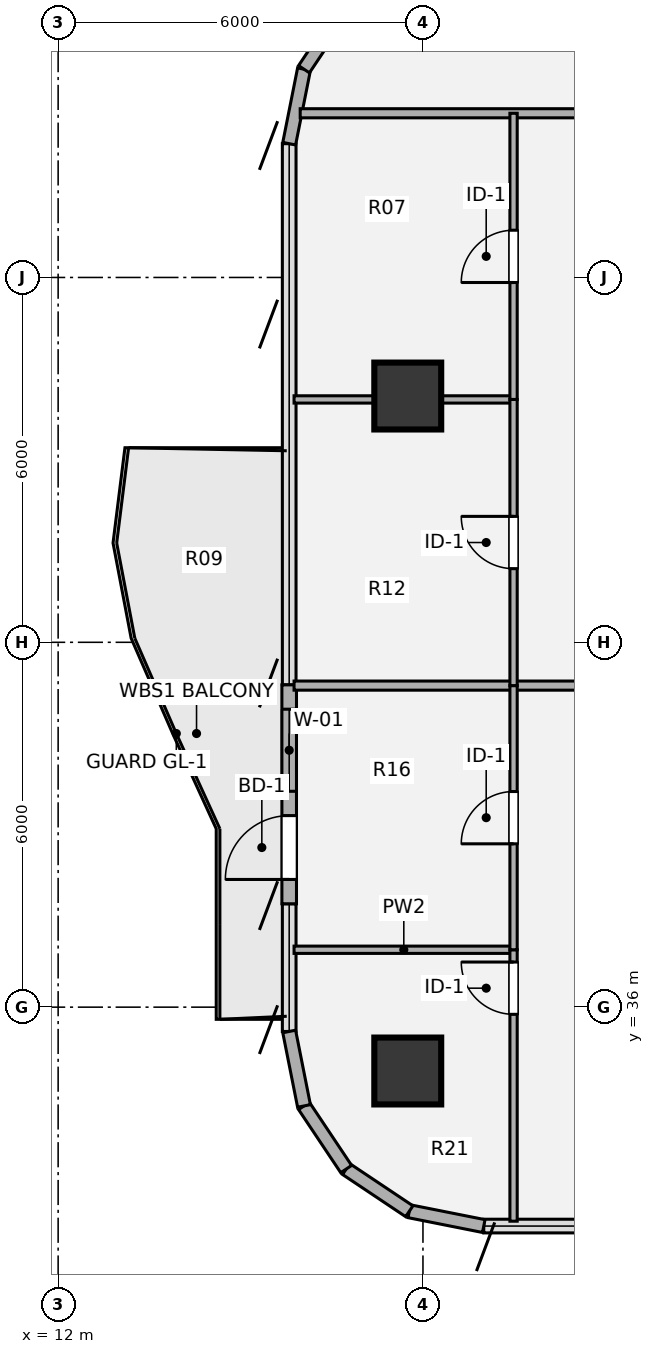
"""IFC4 building model, lengths in metres.
Left out: names, types, materials, properties, quantities, classifications, styles, units other than length and angle.
Written with IfcOpenShell. Run it as: python <this file> out.ifc"""

import sys

from ifc_helpers import new_model, si_unit, direction, frame, frame_2d, origin, origin_2d, place, context, subcontext, project, spatial, rectangle, hollow_circle, extrude, source, transform, mapped, element, fill, save


model = new_model("IFC4")
c1 = context("Model", 3, precision=1e-05, world=origin(), true_north=direction((0.0, 1.0)))
c2 = subcontext(c1, "Body", "Model", "MODEL_VIEW")
j1 = project(units=[si_unit("LENGTHUNIT", "METRE"), si_unit("PLANEANGLEUNIT", "RADIAN")], contexts=[c1])
p1 = place(None, origin())
s1 = spatial("IfcSite", under=j1, at=p1, CompositionType="ELEMENT")
p2 = place(p1, origin())
s2 = spatial("IfcBuilding", under=s1, at=p2, CompositionType="ELEMENT")
p3 = place(p2, frame((0.0, 0.0, 156.42)))
s3 = spatial("IfcBuildingStorey", under=s2, at=p3, CompositionType="ELEMENT", Elevation=156.42)
m1 = source(origin(), c2, "Body", "SweptSolid", [
    extrude(hollow_circle(Radius=0.55, WallThickness=0.04, at=origin_2d()), origin(), (0.0, 0.0, 1.0), 3.78),
])
for number, where, z_axis, x_axis in (
    (1, (17.75, 34.95, 0.0), (0.0, 0.0, 1.0), (1.0, 0.0, 0.0)),
    (2, (17.75, 46.05, 0.0), (0.0, 0.0, 1.0), (1.0, 0.0, 0.0)),
):
    element("IfcColumn", number, at=place(p3, frame(where, z_axis=z_axis, x_axis=x_axis)), inside=s3, PredefinedType="COLUMN", context=c2, shape_type="MappedRepresentation", body=[
        mapped(m1, transform((0.0, 0.0, 0.0), x_axis=(1.0, 0.0, 0.0), y_axis=(0.0, 1.0, 0.0), z_axis=(0.0, 0.0, 1.0), scale=1.0)),
    ])
for number, where, z_axis, x_axis in (
    (3, (19.0, 32.4, 0.0), (0.0, 0.0, 1.0), (-0.981, 0.195, 0.0)),
    (4, (17.775, 32.644, 0.0), (0.0, 0.0, 1.0), (-0.831, 0.556, 0.0)),
    (5, (16.737, 33.337, 0.0), (0.0, 0.0, 1.0), (-0.556, 0.831, 0.0)),
    (6, (16.044, 34.375, 0.0), (0.0, 0.0, 1.0), (-0.195, 0.981, 0.0)),
):
    element("IfcWall", number, at=place(p3, frame(where, z_axis=z_axis, x_axis=x_axis)), inside=s3, PredefinedType="SOLIDWALL", context=c2, shape_type="SweptSolid", body=[
        extrude(rectangle(XDim=1.249, YDim=0.215, at=frame_2d((0.624, 0.0))), origin(), (0.0, 0.0, 1.0), 3.53),
    ])
p4 = place(p3, frame((15.8, 37.7, 0.0), z_axis=(0.0, 0.0, 1.0), x_axis=(0.0, 1.0, 0.0)))
e7 = element("IfcWall", 7, at=p4, inside=s3, PredefinedType="SOLIDWALL", context=c2, shape_type="SweptSolid", body=[
    extrude(rectangle(XDim=3.6, YDim=0.24, at=frame_2d((1.8, 0.0))), origin(), (0.0, 0.0, 1.0), 3.53),
])
p5 = place(p4, frame((0.4, 0.0, 0.0)))
e8 = element("IfcOpeningElement", 8, at=p5, cuts=e7, PredefinedType="OPENING", context=c2, shape_type="SweptSolid", body=[
    extrude(rectangle(XDim=1.05, YDim=2.15, at=origin_2d()), frame((0.525, 0.13, 1.075), z_axis=(0.0, -1.0, 0.0), x_axis=(1.0, 0.0, 0.0)), (0.0, 0.0, 1.0), 0.26),
])
p6 = place(p4, frame((1.85, 0.0, 0.85)))
e9 = element("IfcOpeningElement", 9, at=p6, cuts=e7, PredefinedType="OPENING", context=c2, shape_type="SweptSolid", body=[
    extrude(rectangle(XDim=1.35, YDim=1.35, at=origin_2d()), frame((0.675, 0.13, 0.675), z_axis=(0.0, -1.0, 0.0), x_axis=(1.0, 0.0, 0.0)), (0.0, 0.0, 1.0), 0.26),
])
for number, where, z_axis, x_axis in (
    (10, (15.8, 50.2, 0.0), (0.0, 0.0, 1.0), (0.195, 0.981, 0.0)),
    (11, (16.044, 51.425, 0.0), (0.0, 0.0, 1.0), (0.556, 0.831, 0.0)),
):
    element("IfcWall", number, at=place(p3, frame(where, z_axis=z_axis, x_axis=x_axis)), inside=s3, PredefinedType="SOLIDWALL", context=c2, shape_type="SweptSolid", body=[
        extrude(rectangle(XDim=1.249, YDim=0.215, at=frame_2d((0.624, 0.0))), origin(), (0.0, 0.0, 1.0), 3.53),
    ])
p7 = place(p3, frame((15.88, 36.944, 0.0), z_axis=(0.0, 0.0, 1.0), x_axis=(1.0, 0.0, 0.0)))
e12 = element("IfcWall", 12, at=p7, inside=s3, PredefinedType="PARTITIONING", context=c2, shape_type="SweptSolid", body=[
    extrude(rectangle(XDim=3.61, YDim=0.12, at=frame_2d((1.805, 0.0))), origin(), (0.0, 0.0, 1.0), 2.982),
])
p8 = place(p3, frame((15.88, 41.288, 0.0), z_axis=(0.0, 0.0, 1.0), x_axis=(1.0, 0.0, 0.0)))
e13 = element("IfcWall", 13, at=p8, inside=s3, PredefinedType="PARTITIONING", context=c2, shape_type="SweptSolid", body=[
    extrude(rectangle(XDim=17.67, YDim=0.15, at=frame_2d((8.835, 0.0))), origin(), (0.0, 0.0, 1.0), 2.982),
])
p9 = place(p3, frame((15.88, 45.994, 0.0), z_axis=(0.0, 0.0, 1.0), x_axis=(1.0, 0.0, 0.0)))
e14 = element("IfcWall", 14, at=p9, inside=s3, PredefinedType="PARTITIONING", context=c2, shape_type="SweptSolid", body=[
    extrude(rectangle(XDim=3.61, YDim=0.12, at=frame_2d((1.805, 0.0))), origin(), (0.0, 0.0, 1.0), 2.903),
])
p10 = place(p3, frame((15.981, 50.7, 0.0), z_axis=(0.0, 0.0, 1.0), x_axis=(1.0, 0.0, 0.0)))
e15 = element("IfcWall", 15, at=p10, inside=s3, PredefinedType="PARTITIONING", context=c2, shape_type="SweptSolid", body=[
    extrude(rectangle(XDim=17.569, YDim=0.15, at=frame_2d((8.785, 0.0))), origin(), (0.0, 0.0, 1.0), 3.308),
])
p11 = place(p3, frame((19.49, 32.48, 0.0), z_axis=(0.0, 0.0, 1.0), x_axis=(0.0, 1.0, 0.0)))
e16 = element("IfcWall", 16, at=p11, inside=s3, PredefinedType="PARTITIONING", context=c2, shape_type="SweptSolid", body=[
    extrude(rectangle(XDim=4.464, YDim=0.12, at=frame_2d((2.232, 0.0))), origin(), (0.0, 0.0, 1.0), 3.5),
])
p12 = place(p11, frame((3.402, 0.0, 0.0)))
e17 = element("IfcOpeningElement", 17, at=p12, cuts=e16, PredefinedType="OPENING", context=c2, shape_type="SweptSolid", body=[
    extrude(rectangle(XDim=0.86, YDim=2.1, at=origin_2d()), frame((0.43, 0.07, 1.05), z_axis=(0.0, -1.0, 0.0), x_axis=(1.0, 0.0, 0.0)), (0.0, 0.0, 1.0), 0.14),
])
p13 = place(p3, frame((19.49, 36.944, 0.0), z_axis=(0.0, 0.0, 1.0), x_axis=(0.0, 1.0, 0.0)))
e18 = element("IfcWall", 18, at=p13, inside=s3, PredefinedType="PARTITIONING", context=c2, shape_type="SweptSolid", body=[
    extrude(rectangle(XDim=4.344, YDim=0.12, at=frame_2d((2.172, 0.0))), origin(), (0.0, 0.0, 1.0), 3.5),
])
p14 = place(p13, frame((1.742, 0.0, 0.0)))
e19 = element("IfcOpeningElement", 19, at=p14, cuts=e18, PredefinedType="OPENING", context=c2, shape_type="SweptSolid", body=[
    extrude(rectangle(XDim=0.86, YDim=2.1, at=origin_2d()), frame((0.43, 0.07, 1.05), z_axis=(0.0, -1.0, 0.0), x_axis=(1.0, 0.0, 0.0)), (0.0, 0.0, 1.0), 0.14),
])
p15 = place(p3, frame((19.49, 41.288, 0.0), z_axis=(0.0, 0.0, 1.0), x_axis=(0.0, 1.0, 0.0)))
e20 = element("IfcWall", 20, at=p15, inside=s3, PredefinedType="PARTITIONING", context=c2, shape_type="SweptSolid", body=[
    extrude(rectangle(XDim=4.706, YDim=0.12, at=frame_2d((2.353, 0.0))), origin(), (0.0, 0.0, 1.0), 3.5),
])
p16 = place(p15, frame((1.923, 0.0, 0.0)))
e21 = element("IfcOpeningElement", 21, at=p16, cuts=e20, PredefinedType="OPENING", context=c2, shape_type="SweptSolid", body=[
    extrude(rectangle(XDim=0.86, YDim=2.1, at=origin_2d()), frame((0.43, 0.07, 1.05), z_axis=(0.0, -1.0, 0.0), x_axis=(1.0, 0.0, 0.0)), (0.0, 0.0, 1.0), 0.14),
])
p17 = place(p3, frame((19.49, 45.994, 0.0), z_axis=(0.0, 0.0, 1.0), x_axis=(0.0, 1.0, 0.0)))
e22 = element("IfcWall", 22, at=p17, inside=s3, PredefinedType="PARTITIONING", context=c2, shape_type="SweptSolid", body=[
    extrude(rectangle(XDim=4.706, YDim=0.12, at=frame_2d((2.353, 0.0))), origin(), (0.0, 0.0, 1.0), 3.5),
])
p18 = place(p17, frame((1.923, 0.0, 0.0)))
e23 = element("IfcOpeningElement", 23, at=p18, cuts=e22, PredefinedType="OPENING", context=c2, shape_type="SweptSolid", body=[
    extrude(rectangle(XDim=0.86, YDim=2.1, at=origin_2d()), frame((0.43, 0.07, 1.05), z_axis=(0.0, -1.0, 0.0), x_axis=(1.0, 0.0, 0.0)), (0.0, 0.0, 1.0), 0.14),
])
m2 = source(origin(), c2, "Body", "SweptSolid", [
    extrude(rectangle(XDim=1.05, YDim=2.15, at=origin_2d()), frame((0.525, 0.025, 1.075), z_axis=(0.0, -1.0, 0.0), x_axis=(1.0, 0.0, 0.0)), (0.0, 0.0, 1.0), 0.05),
])
p19 = place(p5, origin())
e24 = element("IfcDoor", 24, at=p19, inside=s3, OperationType="SINGLE_SWING_LEFT", PredefinedType="DOOR", context=c2, shape_type="MappedRepresentation", body=[
    mapped(m2, transform((0.0, 0.0, 0.0), x_axis=(1.0, 0.0, 0.0), y_axis=(0.0, 1.0, 0.0), z_axis=(0.0, 0.0, 1.0), scale=1.0)),
])
fill(e8, e24)
m3 = source(origin(), c2, "Body", "SweptSolid", [
    extrude(rectangle(XDim=1.35, YDim=1.35, at=origin_2d()), frame((0.675, 0.03, 0.675), z_axis=(0.0, -1.0, 0.0), x_axis=(1.0, 0.0, 0.0)), (0.0, 0.0, 1.0), 0.06),
])
p20 = place(p6, origin())
e25 = element("IfcWindow", 25, at=p20, inside=s3, PartitioningType="SINGLE_PANEL", PredefinedType="WINDOW", context=c2, shape_type="MappedRepresentation", body=[
    mapped(m3, transform((0.0, 0.0, 0.0), x_axis=(1.0, 0.0, 0.0), y_axis=(0.0, 1.0, 0.0), z_axis=(0.0, 0.0, 1.0), scale=1.0)),
])
fill(e9, e25)
m4 = source(origin(), c2, "Body", "SweptSolid", [
    extrude(rectangle(XDim=0.86, YDim=2.1, at=origin_2d()), frame((0.43, 0.025, 1.05), z_axis=(0.0, -1.0, 0.0), x_axis=(1.0, 0.0, 0.0)), (0.0, 0.0, 1.0), 0.05),
])
p21 = place(p12, origin())
e26 = element("IfcDoor", 26, at=p21, inside=s3, OperationType="SINGLE_SWING_RIGHT", PredefinedType="DOOR", context=c2, shape_type="MappedRepresentation", body=[
    mapped(m4, transform((0.0, 0.0, 0.0), x_axis=(1.0, 0.0, 0.0), y_axis=(0.0, 1.0, 0.0), z_axis=(0.0, 0.0, 1.0), scale=1.0)),
])
fill(e17, e26)
p22 = place(p14, origin())
e27 = element("IfcDoor", 27, at=p22, inside=s3, OperationType="SINGLE_SWING_LEFT", PredefinedType="DOOR", context=c2, shape_type="MappedRepresentation", body=[
    mapped(m4, transform((0.0, 0.0, 0.0), x_axis=(1.0, 0.0, 0.0), y_axis=(0.0, 1.0, 0.0), z_axis=(0.0, 0.0, 1.0), scale=1.0)),
])
fill(e19, e27)
p23 = place(p16, origin())
e28 = element("IfcDoor", 28, at=p23, inside=s3, OperationType="SINGLE_SWING_RIGHT", PredefinedType="DOOR", context=c2, shape_type="MappedRepresentation", body=[
    mapped(m4, transform((0.0, 0.0, 0.0), x_axis=(1.0, 0.0, 0.0), y_axis=(0.0, 1.0, 0.0), z_axis=(0.0, 0.0, 1.0), scale=1.0)),
])
fill(e21, e28)
p24 = place(p18, origin())
e29 = element("IfcDoor", 29, at=p24, inside=s3, OperationType="SINGLE_SWING_LEFT", PredefinedType="DOOR", context=c2, shape_type="MappedRepresentation", body=[
    mapped(m4, transform((0.0, 0.0, 0.0), x_axis=(1.0, 0.0, 0.0), y_axis=(0.0, 1.0, 0.0), z_axis=(0.0, 0.0, 1.0), scale=1.0)),
])
fill(e23, e29)
save(model, sys.argv[1])
